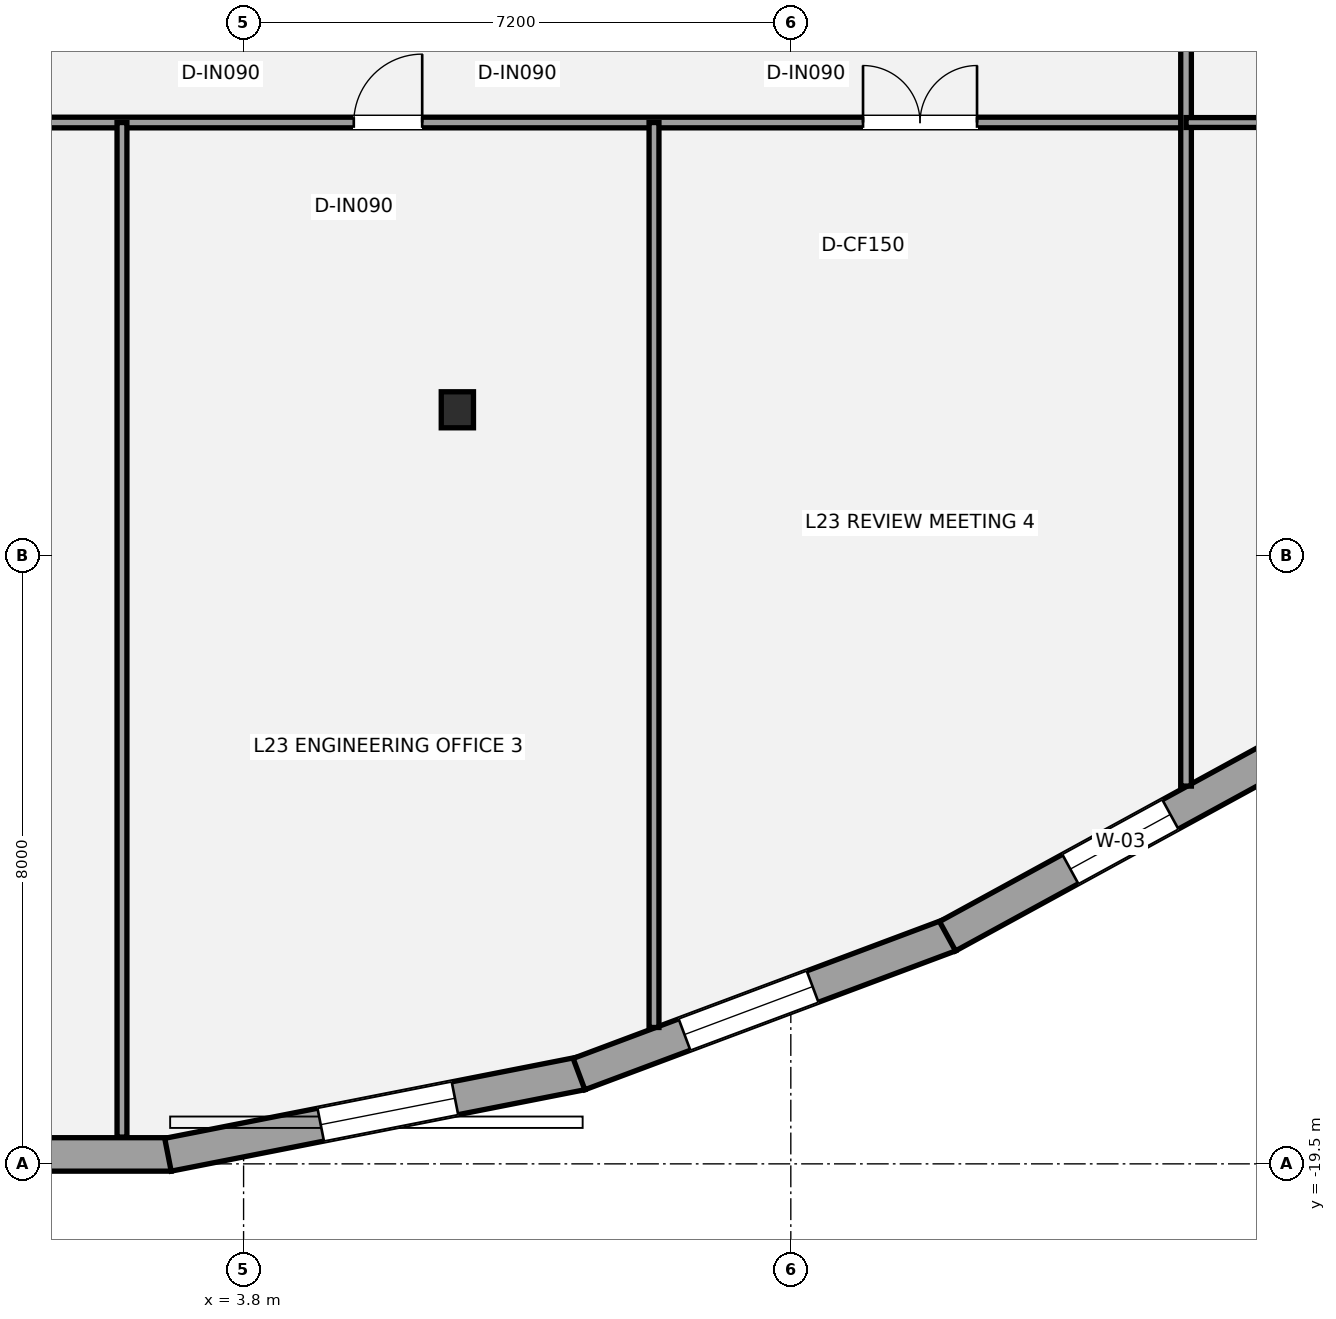
"""IFC4 building model, lengths in metres.
Left out: names, types, materials, properties, quantities, classifications, styles, units other than length and angle.
Written with IfcOpenShell. Run it as: python <this file> out.ifc"""

import sys

from ifc_helpers import new_model, si_unit, direction, frame, frame_2d, origin, origin_2d, place, context, subcontext, project, spatial, rectangle, i_section, extrude, element, fill, save


model = new_model("IFC4")
c1 = context("Model", 3, precision=1e-05, world=origin(), true_north=direction((0.0, 1.0)))
c2 = subcontext(c1, "Body", "Model", "MODEL_VIEW")
j1 = project(units=[si_unit("LENGTHUNIT", "METRE"), si_unit("PLANEANGLEUNIT", "RADIAN")], contexts=[c1])
p1 = place(None, origin())
s1 = spatial("IfcSite", under=j1, at=p1, CompositionType="ELEMENT")
p2 = place(p1, origin())
s2 = spatial("IfcBuilding", under=s1, at=p2, CompositionType="ELEMENT")
p3 = place(p2, frame((0.0, 0.0, 89.6)))
s3 = spatial("IfcBuildingStorey", under=s2, at=p3, CompositionType="ELEMENT", Elevation=89.6)
p4 = place(p3, frame((6.613, -9.579, 0.0), z_axis=(0.0, 0.0, 1.0), x_axis=(1.0, 0.0, 0.0)))
e1 = element("IfcColumn", 1, at=p4, inside=s3, PredefinedType="COLUMN", context=c2, shape_type="SweptSolid", body=[
    extrude(i_section(OverallWidth=0.424, OverallDepth=0.474, WebThickness=0.048, FlangeThickness=0.077, at=origin_2d()), origin(), (0.0, 0.0, 1.0), 3.5),
])
p5 = place(p3, frame((2.847, -19.376, 0.0), z_axis=(0.0, 0.0, 1.0), x_axis=(-1.0, 0.0, 0.0)))
e2 = element("IfcWall", 2, at=p5, inside=s3, PredefinedType="STANDARD", context=c2, shape_type="SweptSolid", body=[
    extrude(rectangle(XDim=5.695, YDim=0.44, at=frame_2d((2.847, 0.0))), origin(), (0.0, 0.0, 1.0), 2.528),
])
p6 = place(p5, frame((2.047, 0.0, 0.65)))
e3 = element("IfcOpeningElement", 3, at=p6, cuts=e2, PredefinedType="OPENING", context=c2, shape_type="SweptSolid", body=[
    extrude(rectangle(XDim=1.8, YDim=1.7, at=frame_2d((0.9, 0.85))), frame((0.0, 0.23, 0.0), z_axis=(0.0, -1.0, 0.0), x_axis=(1.0, 0.0, 0.0)), (0.0, 0.0, 1.0), 0.46),
])
p7 = place(p3, frame((8.248, -18.309, 0.0), z_axis=(0.0, 0.0, 1.0), x_axis=(-0.981185300561, -0.19306839711, 0.0)))
e4 = element("IfcWall", 4, at=p7, inside=s3, PredefinedType="STANDARD", context=c2, shape_type="SweptSolid", body=[
    extrude(rectangle(XDim=5.548, YDim=0.44, at=frame_2d((2.774, 0.0))), origin(), (0.0, 0.0, 1.0), 2.528),
])
p8 = place(p7, frame((1.699, 0.0, 0.65)))
e5 = element("IfcOpeningElement", 5, at=p8, cuts=e4, PredefinedType="OPENING", context=c2, shape_type="SweptSolid", body=[
    extrude(rectangle(XDim=1.8, YDim=1.7, at=frame_2d((0.9, 0.85))), frame((0.0, 0.23, 0.0), z_axis=(0.0, -1.0, 0.0), x_axis=(1.0, 0.0, 0.0)), (0.0, 0.0, 1.0), 0.46),
])
p9 = place(p3, frame((13.09, -16.492, 0.0), z_axis=(0.0, 0.0, 1.0), x_axis=(-0.936473584013, -0.350738116613, 0.0)))
e6 = element("IfcWall", 6, at=p9, inside=s3, PredefinedType="STANDARD", context=c2, shape_type="SweptSolid", body=[
    extrude(rectangle(XDim=5.208, YDim=0.44, at=frame_2d((2.604, 0.0))), origin(), (0.0, 0.0, 1.0), 2.528),
])
p10 = place(p9, frame((1.926, 0.0, 0.65)))
e7 = element("IfcOpeningElement", 7, at=p10, cuts=e6, PredefinedType="OPENING", context=c2, shape_type="SweptSolid", body=[
    extrude(rectangle(XDim=1.8, YDim=1.7, at=frame_2d((0.9, 0.85))), frame((0.0, 0.23, 0.0), z_axis=(0.0, -1.0, 0.0), x_axis=(1.0, 0.0, 0.0)), (0.0, 0.0, 1.0), 0.46),
])
p11 = place(p3, frame((17.304, -14.186, 0.0), z_axis=(0.0, 0.0, 1.0), x_axis=(-0.877445532469, -0.479676284123, 0.0)))
e8 = element("IfcWall", 8, at=p11, inside=s3, PredefinedType="STANDARD", context=c2, shape_type="SweptSolid", body=[
    extrude(rectangle(XDim=4.835, YDim=0.44, at=frame_2d((2.417, 0.0))), origin(), (0.0, 0.0, 1.0), 2.528),
])
p12 = place(p11, frame((1.493, 0.0, 0.65)))
e9 = element("IfcOpeningElement", 9, at=p12, cuts=e8, PredefinedType="OPENING", context=c2, shape_type="SweptSolid", body=[
    extrude(rectangle(XDim=1.5, YDim=1.7, at=frame_2d((0.75, 0.85))), frame((0.0, 0.23, 0.0), z_axis=(0.0, -1.0, 0.0), x_axis=(1.0, 0.0, 0.0)), (0.0, 0.0, 1.0), 0.46),
])
p13 = place(p3, frame((-16.2, -5.8, 0.0), z_axis=(0.0, 0.0, 1.0), x_axis=(1.0, 0.0, 0.0)))
e10 = element("IfcWall", 10, at=p13, inside=s3, PredefinedType="PARTITIONING", context=c2, shape_type="SweptSolid", body=[
    extrude(rectangle(XDim=32.4, YDim=0.14, at=frame_2d((16.2, 0.0))), origin(), (0.0, 0.0, 1.0), 2.763),
])
p14 = place(p13, frame((4.25, 0.0, 0.0)))
e11 = element("IfcOpeningElement", 11, at=p14, cuts=e10, PredefinedType="OPENING", context=c2, shape_type="SweptSolid", body=[
    extrude(rectangle(XDim=0.9, YDim=2.1, at=frame_2d((0.45, 1.05))), frame((0.0, 0.08, 0.0), z_axis=(0.0, -1.0, 0.0), x_axis=(1.0, 0.0, 0.0)), (0.0, 0.0, 1.0), 0.16),
])
p15 = place(p13, frame((13.15, 0.0, 0.0)))
e12 = element("IfcOpeningElement", 12, at=p15, cuts=e10, PredefinedType="OPENING", context=c2, shape_type="SweptSolid", body=[
    extrude(rectangle(XDim=1.5, YDim=2.15, at=frame_2d((0.75, 1.075))), frame((0.0, 0.08, 0.0), z_axis=(0.0, -1.0, 0.0), x_axis=(1.0, 0.0, 0.0)), (0.0, 0.0, 1.0), 0.16),
])
p16 = place(p13, frame((21.45, 0.0, 0.0)))
e13 = element("IfcOpeningElement", 13, at=p16, cuts=e10, PredefinedType="OPENING", context=c2, shape_type="SweptSolid", body=[
    extrude(rectangle(XDim=0.9, YDim=2.1, at=frame_2d((0.45, 1.05))), frame((0.0, 0.08, 0.0), z_axis=(0.0, -1.0, 0.0), x_axis=(1.0, 0.0, 0.0)), (0.0, 0.0, 1.0), 0.16),
])
p17 = place(p13, frame((28.15, 0.0, 0.0)))
e14 = element("IfcOpeningElement", 14, at=p17, cuts=e10, PredefinedType="OPENING", context=c2, shape_type="SweptSolid", body=[
    extrude(rectangle(XDim=1.5, YDim=2.15, at=frame_2d((0.75, 1.075))), frame((0.0, 0.08, 0.0), z_axis=(0.0, -1.0, 0.0), x_axis=(1.0, 0.0, 0.0)), (0.0, 0.0, 1.0), 0.16),
])
p18 = place(p3, frame((16.2, -14.53, 0.0), z_axis=(0.0, 0.0, 1.0), x_axis=(0.0, 1.0, 0.0)))
e15 = element("IfcWall", 15, at=p18, inside=s3, PredefinedType="PARTITIONING", context=c2, shape_type="SweptSolid", body=[
    extrude(rectangle(XDim=22.08, YDim=0.14, at=frame_2d((11.04, 0.0))), origin(), (0.0, 0.0, 1.0), 2.751),
])
p19 = place(p18, frame((10.281, 0.0, 0.0)))
e16 = element("IfcOpeningElement", 16, at=p19, cuts=e15, PredefinedType="OPENING", context=c2, shape_type="SweptSolid", body=[
    extrude(rectangle(XDim=0.9, YDim=2.1, at=frame_2d((0.45, 1.05))), frame((0.0, 0.08, 0.0), z_axis=(0.0, -1.0, 0.0), x_axis=(1.0, 0.0, 0.0)), (0.0, 0.0, 1.0), 0.16),
])
p20 = place(p18, frame((14.18, 0.0, 0.0)))
e17 = element("IfcOpeningElement", 17, at=p20, cuts=e15, PredefinedType="OPENING", context=c2, shape_type="SweptSolid", body=[
    extrude(rectangle(XDim=0.9, YDim=2.1, at=frame_2d((0.45, 1.05))), frame((0.0, 0.08, 0.0), z_axis=(0.0, -1.0, 0.0), x_axis=(1.0, 0.0, 0.0)), (0.0, 0.0, 1.0), 0.16),
])
p21 = place(p18, frame((17.68, 0.0, 0.0)))
e18 = element("IfcOpeningElement", 18, at=p21, cuts=e15, PredefinedType="OPENING", context=c2, shape_type="SweptSolid", body=[
    extrude(rectangle(XDim=0.9, YDim=2.1, at=frame_2d((0.45, 1.05))), frame((0.0, 0.08, 0.0), z_axis=(0.0, -1.0, 0.0), x_axis=(1.0, 0.0, 0.0)), (0.0, 0.0, 1.0), 0.16),
])
p22 = place(p18, frame((20.455, 0.0, 0.0)))
e19 = element("IfcOpeningElement", 19, at=p22, cuts=e15, PredefinedType="OPENING", context=c2, shape_type="SweptSolid", body=[
    extrude(rectangle(XDim=0.9, YDim=2.1, at=frame_2d((0.45, 1.05))), frame((0.0, 0.08, 0.0), z_axis=(0.0, -1.0, 0.0), x_axis=(1.0, 0.0, 0.0)), (0.0, 0.0, 1.0), 0.16),
])
p23 = place(p3, frame((2.2, -19.148, 0.0), z_axis=(0.0, 0.0, 1.0), x_axis=(0.0, 1.0, 0.0)))
e20 = element("IfcWall", 20, at=p23, inside=s3, PredefinedType="PARTITIONING", context=c2, shape_type="SweptSolid", body=[
    extrude(rectangle(XDim=13.348, YDim=0.13, at=frame_2d((6.674, 0.0))), origin(), (0.0, 0.0, 1.0), 2.763),
])
p24 = place(p3, frame((9.2, -17.706, 0.0), z_axis=(0.0, 0.0, 1.0), x_axis=(0.0, 1.0, 0.0)))
e21 = element("IfcWall", 21, at=p24, inside=s3, PredefinedType="PARTITIONING", context=c2, shape_type="SweptSolid", body=[
    extrude(rectangle(XDim=11.906, YDim=0.13, at=frame_2d((5.953, 0.0))), origin(), (0.0, 0.0, 1.0), 2.763),
])
p25 = place(p3, frame((16.2, -5.8, 0.0), z_axis=(0.0, 0.0, 1.0), x_axis=(1.0, 0.0, 0.0)))
e22 = element("IfcWall", 22, at=p25, inside=s3, PredefinedType="PARTITIONING", context=c2, shape_type="SweptSolid", body=[
    extrude(rectangle(XDim=10.404, YDim=0.13, at=frame_2d((5.202, 0.0))), origin(), (0.0, 0.0, 1.0), 2.688),
])
p26 = place(p25, frame((1.73, 0.0, 0.0)))
e23 = element("IfcOpeningElement", 23, at=p26, cuts=e22, PredefinedType="OPENING", context=c2, shape_type="SweptSolid", body=[
    extrude(rectangle(XDim=0.9, YDim=2.1, at=frame_2d((0.45, 1.05))), frame((0.0, 0.075, 0.0), z_axis=(0.0, -1.0, 0.0), x_axis=(1.0, 0.0, 0.0)), (0.0, 0.0, 1.0), 0.15),
])
p27 = place(p8, origin())
e24 = element("IfcWindow", 24, at=p27, inside=s3, PartitioningType="SINGLE_PANEL", PredefinedType="WINDOW", context=c2, shape_type="SweptSolid", body=[
    extrude(rectangle(XDim=1.8, YDim=1.7, at=frame_2d((0.9, 0.85))), frame((0.0, -0.01, 0.0), z_axis=(0.0, -1.0, 0.0), x_axis=(1.0, 0.0, 0.0)), (0.0, 0.0, 1.0), 0.06),
])
fill(e5, e24)
p28 = place(p10, origin())
e25 = element("IfcWindow", 25, at=p28, inside=s3, PartitioningType="SINGLE_PANEL", PredefinedType="WINDOW", context=c2, shape_type="SweptSolid", body=[
    extrude(rectangle(XDim=1.8, YDim=1.7, at=frame_2d((0.9, 0.85))), frame((0.0, -0.01, 0.0), z_axis=(0.0, -1.0, 0.0), x_axis=(1.0, 0.0, 0.0)), (0.0, 0.0, 1.0), 0.06),
])
fill(e7, e25)
p29 = place(p12, origin())
e26 = element("IfcWindow", 26, at=p29, inside=s3, PartitioningType="SINGLE_PANEL", PredefinedType="WINDOW", context=c2, shape_type="SweptSolid", body=[
    extrude(rectangle(XDim=1.5, YDim=1.7, at=frame_2d((0.75, 0.85))), frame((0.0, -0.01, 0.0), z_axis=(0.0, -1.0, 0.0), x_axis=(1.0, 0.0, 0.0)), (0.0, 0.0, 1.0), 0.06),
])
fill(e9, e26)
p30 = place(p16, origin())
e27 = element("IfcDoor", 27, at=p30, inside=s3, OperationType="SINGLE_SWING_RIGHT", PredefinedType="DOOR", context=c2, shape_type="SweptSolid", body=[
    extrude(rectangle(XDim=0.9, YDim=2.1, at=frame_2d((0.45, 1.05))), frame((0.0, 0.025, 0.0), z_axis=(0.0, -1.0, 0.0), x_axis=(1.0, 0.0, 0.0)), (0.0, 0.0, 1.0), 0.05),
])
fill(e13, e27)
p31 = place(p17, origin())
e28 = element("IfcDoor", 28, at=p31, inside=s3, OperationType="DOUBLE_DOOR_SINGLE_SWING", PredefinedType="DOOR", context=c2, shape_type="SweptSolid", body=[
    extrude(rectangle(XDim=1.5, YDim=2.15, at=frame_2d((0.75, 1.075))), frame((0.0, 0.025, 0.0), z_axis=(0.0, -1.0, 0.0), x_axis=(1.0, 0.0, 0.0)), (0.0, 0.0, 1.0), 0.05),
])
fill(e14, e28)
save(model, sys.argv[1])
